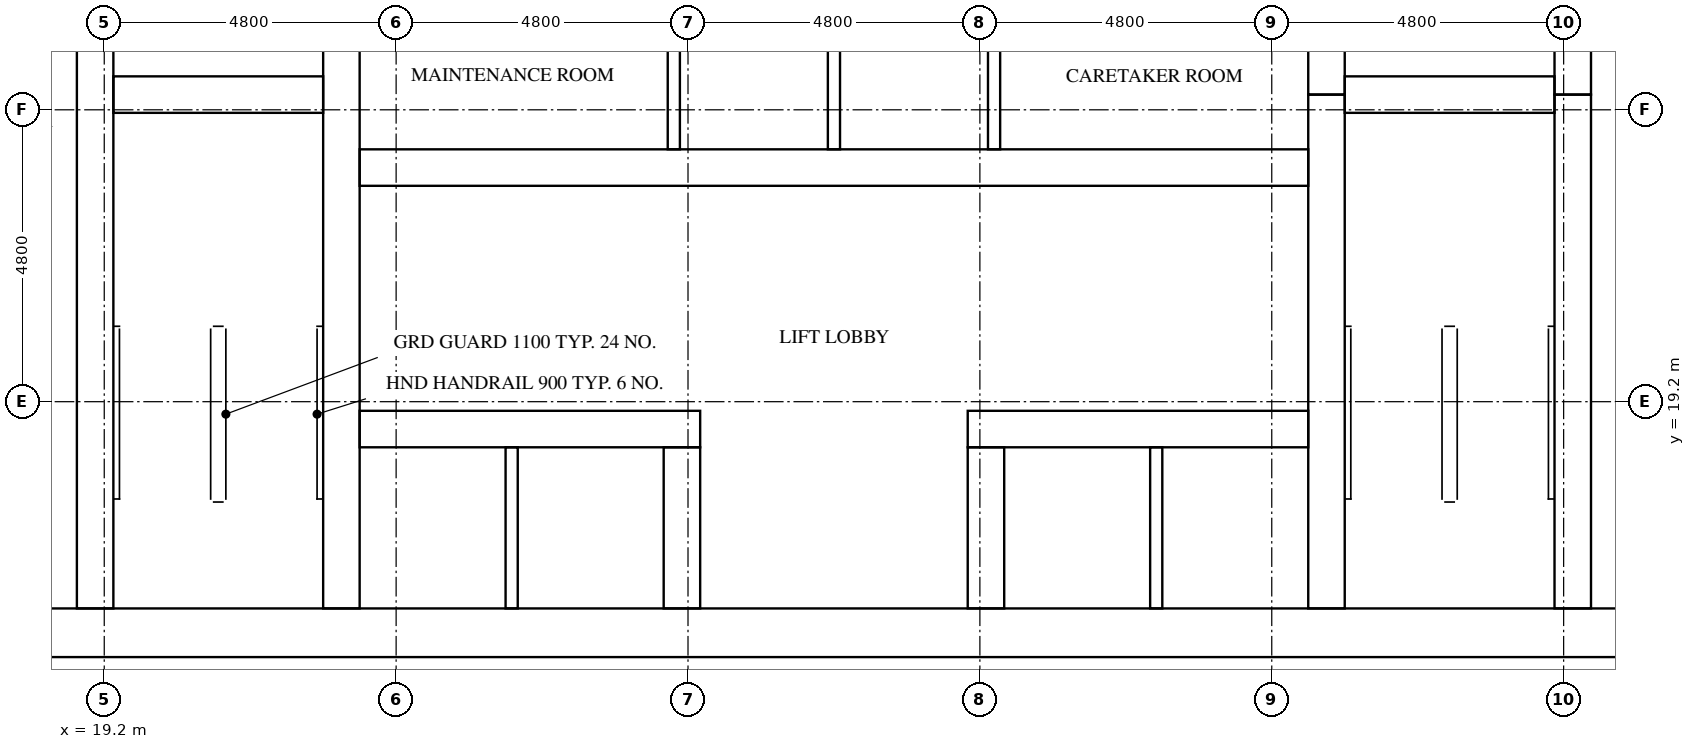
"""IFC4 building model, lengths in metres.
Left out: names, types, materials, properties, quantities, classifications, styles, units other than length and angle.
Written with IfcOpenShell. Run it as: python <this file> out.ifc"""

import sys

from ifc_helpers import new_model, si_unit, direction, frame, frame_2d, origin, place, context, subcontext, project, spatial, rectangle, extrude, element, fill, save


model = new_model("IFC4")
c1 = context("Model", 3, precision=1e-05, world=origin(), true_north=direction((0.0, 1.0)))
c2 = subcontext(c1, "Body", "Model", "MODEL_VIEW")
j1 = project(units=[si_unit("LENGTHUNIT", "METRE"), si_unit("PLANEANGLEUNIT", "RADIAN")], contexts=[c1])
p1 = place(None, origin())
s1 = spatial("IfcSite", under=j1, at=p1, CompositionType="ELEMENT")
p2 = place(p1, origin())
s2 = spatial("IfcBuilding", under=s1, at=p2, CompositionType="ELEMENT")
p3 = place(p2, frame((0.0, 0.0, 129.6)))
s3 = spatial("IfcBuildingStorey", under=s2, at=p3, CompositionType="ELEMENT", Elevation=129.6)
p4 = place(p3, frame((15.0, 15.4, 0.0), z_axis=(0.0, 0.0, 1.0), x_axis=(1.0, 0.0, 0.0)))
e1 = element("IfcWall", 1, at=p4, inside=s3, PredefinedType="SHEAR", context=c2, shape_type="SweptSolid", body=[
    extrude(rectangle(XDim=32.4, YDim=0.8, at=frame_2d((16.2, 0.0))), origin(), (0.0, 0.0, 1.0), 3.2),
])
p5 = place(p4, frame((15.3, 0.0, 0.0)))
e2 = element("IfcOpeningElement", 2, at=p5, cuts=e1, PredefinedType="OPENING", context=c2, shape_type="SweptSolid", body=[
    extrude(rectangle(XDim=1.8, YDim=2.1, at=frame_2d((0.9, 1.05))), frame((0.0, 0.41, 0.0), z_axis=(0.0, -1.0, 0.0), x_axis=(1.0, 0.0, 0.0)), (0.0, 0.0, 1.0), 0.82),
])
p6 = place(p3, frame((19.05, 15.8, 0.0), z_axis=(0.0, 0.0, 1.0), x_axis=(0.0, 1.0, 0.0)))
e3 = element("IfcWall", 3, at=p6, inside=s3, PredefinedType="SHEAR", context=c2, shape_type="SweptSolid", body=[
    extrude(rectangle(XDim=15.15, YDim=0.6, at=frame_2d((7.575, 0.0))), origin(), (0.0, 0.0, 1.0), 3.2),
])
p7 = place(p6, frame((9.65, 0.0, 0.0)))
e4 = element("IfcOpeningElement", 4, at=p7, cuts=e3, PredefinedType="OPENING", context=c2, shape_type="SweptSolid", body=[
    extrude(rectangle(XDim=1.1, YDim=2.1, at=frame_2d((0.55, 1.05))), frame((0.0, 0.31, 0.0), z_axis=(0.0, -1.0, 0.0), x_axis=(1.0, 0.0, 0.0)), (0.0, 0.0, 1.0), 0.62),
])
p8 = place(p6, frame((13.15, 0.0, 0.0)))
e5 = element("IfcOpeningElement", 5, at=p8, cuts=e3, PredefinedType="OPENING", context=c2, shape_type="SweptSolid", body=[
    extrude(rectangle(XDim=1.1, YDim=2.1, at=frame_2d((0.55, 1.05))), frame((0.0, 0.31, 0.0), z_axis=(0.0, -1.0, 0.0), x_axis=(1.0, 0.0, 0.0)), (0.0, 0.0, 1.0), 0.62),
])
p9 = place(p6, frame((0.4, 0.0, 0.0)))
e6 = element("IfcOpeningElement", 6, at=p9, cuts=e3, PredefinedType="OPENING", context=c2, shape_type="SweptSolid", body=[
    extrude(rectangle(XDim=1.2, YDim=2.1, at=frame_2d((0.6, 1.05))), frame((0.0, 0.31, 0.0), z_axis=(0.0, -1.0, 0.0), x_axis=(1.0, 0.0, 0.0)), (0.0, 0.0, 1.0), 0.62),
])
p10 = place(p3, frame((23.1, 15.8, 0.0), z_axis=(0.0, 0.0, 1.0), x_axis=(0.0, 1.0, 0.0)))
e7 = element("IfcWall", 7, at=p10, inside=s3, PredefinedType="SHEAR", context=c2, shape_type="SweptSolid", body=[
    extrude(rectangle(XDim=21.2, YDim=0.6, at=frame_2d((10.6, 0.0))), origin(), (0.0, 0.0, 1.0), 3.2),
])
p11 = place(p3, frame((39.3, 15.8, 0.0), z_axis=(0.0, 0.0, 1.0), x_axis=(0.0, 1.0, 0.0)))
e8 = element("IfcWall", 8, at=p11, inside=s3, PredefinedType="SHEAR", context=c2, shape_type="SweptSolid", body=[
    extrude(rectangle(XDim=8.45, YDim=0.6, at=frame_2d((4.225, 0.0))), origin(), (0.0, 0.0, 1.0), 3.2),
])
p12 = place(p3, frame((39.3, 24.25, 0.0), z_axis=(0.0, 0.0, 1.0), x_axis=(0.0, 1.0, 0.0)))
e9 = element("IfcWall", 9, at=p12, inside=s3, PredefinedType="SHEAR", context=c2, shape_type="SweptSolid", body=[
    extrude(rectangle(XDim=3.5, YDim=0.6, at=frame_2d((1.75, 0.0))), origin(), (0.0, 0.0, 1.0), 3.2),
])
p13 = place(p3, frame((43.35, 15.8, 0.0), z_axis=(0.0, 0.0, 1.0), x_axis=(0.0, 1.0, 0.0)))
e10 = element("IfcWall", 10, at=p13, inside=s3, PredefinedType="SHEAR", context=c2, shape_type="SweptSolid", body=[
    extrude(rectangle(XDim=8.45, YDim=0.6, at=frame_2d((4.225, 0.0))), origin(), (0.0, 0.0, 1.0), 3.2),
])
p14 = place(p13, frame((0.4, 0.0, 0.0)))
e11 = element("IfcOpeningElement", 11, at=p14, cuts=e10, PredefinedType="OPENING", context=c2, shape_type="SweptSolid", body=[
    extrude(rectangle(XDim=1.2, YDim=2.1, at=frame_2d((0.6, 1.05))), frame((0.0, 0.31, 0.0), z_axis=(0.0, -1.0, 0.0), x_axis=(1.0, 0.0, 0.0)), (0.0, 0.0, 1.0), 0.62),
])
p15 = place(p3, frame((43.35, 24.25, 0.0), z_axis=(0.0, 0.0, 1.0), x_axis=(0.0, 1.0, 0.0)))
e12 = element("IfcWall", 12, at=p15, inside=s3, PredefinedType="SHEAR", context=c2, shape_type="SweptSolid", body=[
    extrude(rectangle(XDim=3.5, YDim=0.6, at=frame_2d((1.75, 0.0))), origin(), (0.0, 0.0, 1.0), 3.2),
])
p16 = place(p15, frame((1.2, 0.0, 0.0)))
e13 = element("IfcOpeningElement", 13, at=p16, cuts=e12, PredefinedType="OPENING", context=c2, shape_type="SweptSolid", body=[
    extrude(rectangle(XDim=1.1, YDim=2.1, at=frame_2d((0.55, 1.05))), frame((0.0, 0.31, 0.0), z_axis=(0.0, -1.0, 0.0), x_axis=(1.0, 0.0, 0.0)), (0.0, 0.0, 1.0), 0.62),
])
for number, where, z_axis, x_axis in (
    (14, (19.35, 24.25, 0.0), (0.0, 0.0, 1.0), (1.0, 0.0, 0.0)),
    (15, (39.6, 24.25, 0.0), (0.0, 0.0, 1.0), (1.0, 0.0, 0.0)),
):
    element("IfcWall", number, at=place(p3, frame(where, z_axis=z_axis, x_axis=x_axis)), inside=s3, PredefinedType="SHEAR", context=c2, shape_type="SweptSolid", body=[
        extrude(rectangle(XDim=3.45, YDim=0.6, at=frame_2d((1.725, 0.0))), origin(), (0.0, 0.0, 1.0), 3.2),
    ])
p17 = place(p3, frame((23.4, 18.75, 0.0), z_axis=(0.0, 0.0, 1.0), x_axis=(1.0, 0.0, 0.0)))
e16 = element("IfcWall", 16, at=p17, inside=s3, PredefinedType="SHEAR", context=c2, shape_type="SweptSolid", body=[
    extrude(rectangle(XDim=5.6, YDim=0.6, at=frame_2d((2.8, 0.0))), origin(), (0.0, 0.0, 1.0), 3.2),
])
p18 = place(p17, frame((0.65, 0.0, 0.0)))
e17 = element("IfcOpeningElement", 17, at=p18, cuts=e16, PredefinedType="OPENING", context=c2, shape_type="SweptSolid", body=[
    extrude(rectangle(XDim=1.1, YDim=2.1, at=frame_2d((0.55, 1.05))), frame((0.0, 0.31, 0.0), z_axis=(0.0, -1.0, 0.0), x_axis=(1.0, 0.0, 0.0)), (0.0, 0.0, 1.0), 0.62),
])
p19 = place(p17, frame((3.25, 0.0, 0.0)))
e18 = element("IfcOpeningElement", 18, at=p19, cuts=e16, PredefinedType="OPENING", context=c2, shape_type="SweptSolid", body=[
    extrude(rectangle(XDim=1.1, YDim=2.1, at=frame_2d((0.55, 1.05))), frame((0.0, 0.31, 0.0), z_axis=(0.0, -1.0, 0.0), x_axis=(1.0, 0.0, 0.0)), (0.0, 0.0, 1.0), 0.62),
])
p20 = place(p3, frame((33.4, 18.75, 0.0), z_axis=(0.0, 0.0, 1.0), x_axis=(1.0, 0.0, 0.0)))
e19 = element("IfcWall", 19, at=p20, inside=s3, PredefinedType="SHEAR", context=c2, shape_type="SweptSolid", body=[
    extrude(rectangle(XDim=5.6, YDim=0.6, at=frame_2d((2.8, 0.0))), origin(), (0.0, 0.0, 1.0), 3.2),
])
p21 = place(p20, frame((1.25, 0.0, 0.0)))
e20 = element("IfcOpeningElement", 20, at=p21, cuts=e19, PredefinedType="OPENING", context=c2, shape_type="SweptSolid", body=[
    extrude(rectangle(XDim=1.1, YDim=2.1, at=frame_2d((0.55, 1.05))), frame((0.0, 0.31, 0.0), z_axis=(0.0, -1.0, 0.0), x_axis=(1.0, 0.0, 0.0)), (0.0, 0.0, 1.0), 0.62),
])
p22 = place(p20, frame((3.85, 0.0, 0.0)))
e21 = element("IfcOpeningElement", 21, at=p22, cuts=e19, PredefinedType="OPENING", context=c2, shape_type="SweptSolid", body=[
    extrude(rectangle(XDim=1.1, YDim=2.1, at=frame_2d((0.55, 1.05))), frame((0.0, 0.31, 0.0), z_axis=(0.0, -1.0, 0.0), x_axis=(1.0, 0.0, 0.0)), (0.0, 0.0, 1.0), 0.62),
])
p23 = place(p3, frame((23.4, 23.05, 0.0), z_axis=(0.0, 0.0, 1.0), x_axis=(1.0, 0.0, 0.0)))
e22 = element("IfcWall", 22, at=p23, inside=s3, PredefinedType="SHEAR", context=c2, shape_type="SweptSolid", body=[
    extrude(rectangle(XDim=15.6, YDim=0.6, at=frame_2d((7.8, 0.0))), origin(), (0.0, 0.0, 1.0), 3.2),
])
p24 = place(p23, frame((2.033, 0.0, 0.0)))
e23 = element("IfcOpeningElement", 23, at=p24, cuts=e22, PredefinedType="OPENING", context=c2, shape_type="SweptSolid", body=[
    extrude(rectangle(XDim=1.0, YDim=2.1, at=frame_2d((0.5, 1.05))), frame((0.0, 0.31, 0.0), z_axis=(0.0, -1.0, 0.0), x_axis=(1.0, 0.0, 0.0)), (0.0, 0.0, 1.0), 0.62),
])
p25 = place(p23, frame((12.567, 0.0, 0.0)))
e24 = element("IfcOpeningElement", 24, at=p25, cuts=e22, PredefinedType="OPENING", context=c2, shape_type="SweptSolid", body=[
    extrude(rectangle(XDim=1.0, YDim=2.1, at=frame_2d((0.5, 1.05))), frame((0.0, 0.31, 0.0), z_axis=(0.0, -1.0, 0.0), x_axis=(1.0, 0.0, 0.0)), (0.0, 0.0, 1.0), 0.62),
])
for number, where, z_axis, x_axis in (
    (25, (28.7, 15.8, 0.0), (0.0, 0.0, 1.0), (0.0, 1.0, 0.0)),
    (26, (33.7, 15.8, 0.0), (0.0, 0.0, 1.0), (0.0, 1.0, 0.0)),
):
    element("IfcWall", number, at=place(p3, frame(where, z_axis=z_axis, x_axis=x_axis)), inside=s3, PredefinedType="SHEAR", context=c2, shape_type="SweptSolid", body=[
        extrude(rectangle(XDim=2.65, YDim=0.6, at=frame_2d((1.325, 0.0))), origin(), (0.0, 0.0, 1.0), 3.2),
    ])
for number, where, z_axis, x_axis in (
    (27, (28.567, 23.35, 0.0), (0.0, 0.0, 1.0), (0.0, 1.0, 0.0)),
    (28, (31.2, 23.35, 0.0), (0.0, 0.0, 1.0), (0.0, 1.0, 0.0)),
    (29, (33.833, 23.35, 0.0), (0.0, 0.0, 1.0), (0.0, 1.0, 0.0)),
):
    element("IfcWall", number, at=place(p3, frame(where, z_axis=z_axis, x_axis=x_axis)), inside=s3, PredefinedType="SOLIDWALL", context=c2, shape_type="SweptSolid", body=[
        extrude(rectangle(XDim=2.5, YDim=0.2, at=frame_2d((1.25, 0.0))), origin(), (0.0, 0.0, 1.0), 3.2),
    ])
for number, where, z_axis, x_axis in (
    (30, (25.9, 15.8, 0.0), (0.0, 0.0, 1.0), (0.0, 1.0, 0.0)),
    (31, (36.5, 15.8, 0.0), (0.0, 0.0, 1.0), (0.0, 1.0, 0.0)),
):
    element("IfcWall", number, at=place(p3, frame(where, z_axis=z_axis, x_axis=x_axis)), inside=s3, PredefinedType="SOLIDWALL", context=c2, shape_type="SweptSolid", body=[
        extrude(rectangle(XDim=2.65, YDim=0.2, at=frame_2d((1.325, 0.0))), origin(), (0.0, 0.0, 1.0), 3.2),
    ])
p26 = place(p18, origin())
e32 = element("IfcDoor", 32, at=p26, inside=s3, OperationType="DOUBLE_DOOR_SLIDING", PredefinedType="DOOR", context=c2, shape_type="SweptSolid", body=[
    extrude(rectangle(XDim=1.1, YDim=2.1, at=frame_2d((0.55, 1.05))), frame((0.0, 0.025, 0.0), z_axis=(0.0, -1.0, 0.0), x_axis=(1.0, 0.0, 0.0)), (0.0, 0.0, 1.0), 0.05),
])
fill(e17, e32)
p27 = place(p19, origin())
e33 = element("IfcDoor", 33, at=p27, inside=s3, OperationType="DOUBLE_DOOR_SLIDING", PredefinedType="DOOR", context=c2, shape_type="SweptSolid", body=[
    extrude(rectangle(XDim=1.1, YDim=2.1, at=frame_2d((0.55, 1.05))), frame((0.0, 0.025, 0.0), z_axis=(0.0, -1.0, 0.0), x_axis=(1.0, 0.0, 0.0)), (0.0, 0.0, 1.0), 0.05),
])
fill(e18, e33)
p28 = place(p21, origin())
e34 = element("IfcDoor", 34, at=p28, inside=s3, OperationType="DOUBLE_DOOR_SLIDING", PredefinedType="DOOR", context=c2, shape_type="SweptSolid", body=[
    extrude(rectangle(XDim=1.1, YDim=2.1, at=frame_2d((0.55, 1.05))), frame((0.0, 0.025, 0.0), z_axis=(0.0, -1.0, 0.0), x_axis=(1.0, 0.0, 0.0)), (0.0, 0.0, 1.0), 0.05),
])
fill(e20, e34)
p29 = place(p22, origin())
e35 = element("IfcDoor", 35, at=p29, inside=s3, OperationType="DOUBLE_DOOR_SLIDING", PredefinedType="DOOR", context=c2, shape_type="SweptSolid", body=[
    extrude(rectangle(XDim=1.1, YDim=2.1, at=frame_2d((0.55, 1.05))), frame((0.0, 0.025, 0.0), z_axis=(0.0, -1.0, 0.0), x_axis=(1.0, 0.0, 0.0)), (0.0, 0.0, 1.0), 0.05),
])
fill(e21, e35)
p30 = place(p9, frame((1.2, 0.0, 0.0), z_axis=(0.0, 0.0, 1.0), x_axis=(-1.0, 0.0, 0.0)))
e36 = element("IfcDoor", 36, at=p30, inside=s3, OperationType="SINGLE_SWING_LEFT", PredefinedType="DOOR", context=c2, shape_type="SweptSolid", body=[
    extrude(rectangle(XDim=1.2, YDim=2.1, at=frame_2d((0.6, 1.05))), frame((0.0, 0.025, 0.0), z_axis=(0.0, -1.0, 0.0), x_axis=(1.0, 0.0, 0.0)), (0.0, 0.0, 1.0), 0.05),
])
fill(e6, e36)
p31 = place(p14, origin())
e37 = element("IfcDoor", 37, at=p31, inside=s3, OperationType="SINGLE_SWING_RIGHT", PredefinedType="DOOR", context=c2, shape_type="SweptSolid", body=[
    extrude(rectangle(XDim=1.2, YDim=2.1, at=frame_2d((0.6, 1.05))), frame((0.0, 0.025, 0.0), z_axis=(0.0, -1.0, 0.0), x_axis=(1.0, 0.0, 0.0)), (0.0, 0.0, 1.0), 0.05),
])
fill(e11, e37)
p32 = place(p5, frame((1.8, 0.0, 0.0), z_axis=(0.0, 0.0, 1.0), x_axis=(-1.0, 0.0, 0.0)))
e38 = element("IfcDoor", 38, at=p32, inside=s3, OperationType="DOUBLE_DOOR_SINGLE_SWING", PredefinedType="DOOR", context=c2, shape_type="SweptSolid", body=[
    extrude(rectangle(XDim=1.8, YDim=2.1, at=frame_2d((0.9, 1.05))), frame((0.0, 0.025, 0.0), z_axis=(0.0, -1.0, 0.0), x_axis=(1.0, 0.0, 0.0)), (0.0, 0.0, 1.0), 0.05),
])
fill(e2, e38)
p33 = place(p24, frame((1.0, 0.0, 0.0), z_axis=(0.0, 0.0, 1.0), x_axis=(-1.0, 0.0, 0.0)))
e39 = element("IfcDoor", 39, at=p33, inside=s3, OperationType="SINGLE_SWING_RIGHT", PredefinedType="DOOR", context=c2, shape_type="SweptSolid", body=[
    extrude(rectangle(XDim=1.0, YDim=2.1, at=frame_2d((0.5, 1.05))), frame((0.0, 0.025, 0.0), z_axis=(0.0, -1.0, 0.0), x_axis=(1.0, 0.0, 0.0)), (0.0, 0.0, 1.0), 0.05),
])
fill(e23, e39)
p34 = place(p25, frame((1.0, 0.0, 0.0), z_axis=(0.0, 0.0, 1.0), x_axis=(-1.0, 0.0, 0.0)))
e40 = element("IfcDoor", 40, at=p34, inside=s3, OperationType="SINGLE_SWING_LEFT", PredefinedType="DOOR", context=c2, shape_type="SweptSolid", body=[
    extrude(rectangle(XDim=1.0, YDim=2.1, at=frame_2d((0.5, 1.05))), frame((0.0, 0.025, 0.0), z_axis=(0.0, -1.0, 0.0), x_axis=(1.0, 0.0, 0.0)), (0.0, 0.0, 1.0), 0.05),
])
fill(e24, e40)
save(model, sys.argv[1])
